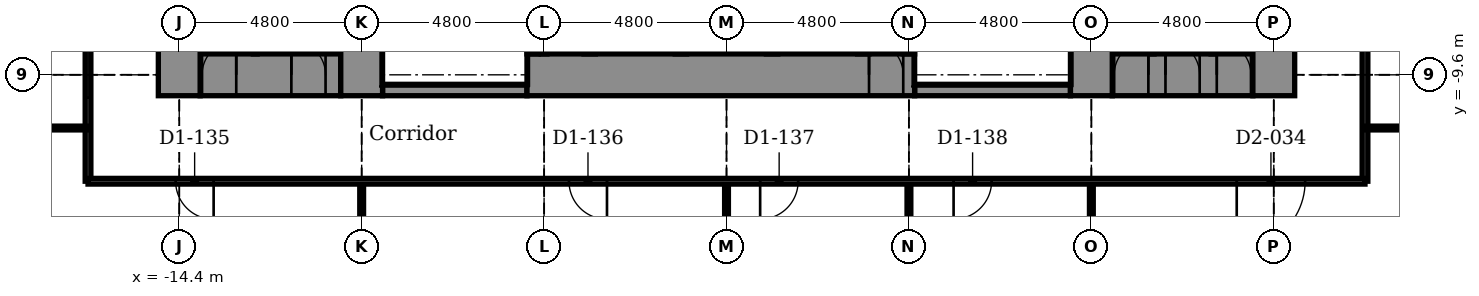
"""IFC4 building model, lengths in metres.
Left out: names, types, materials, properties, quantities, classifications, styles, units other than length and angle.
Written with IfcOpenShell. Run it as: python <this file> out.ifc"""

import sys

from ifc_helpers import new_model, si_unit, direction, frame, frame_2d, origin, place, context, subcontext, project, spatial, rectangle, extrude, element, fill, save


model = new_model("IFC4")
c1 = context("Model", 3, precision=1e-05, world=origin(), true_north=direction((0.0, 1.0)))
c2 = subcontext(c1, "Body", "Model", "MODEL_VIEW")
j1 = project(units=[si_unit("LENGTHUNIT", "METRE"), si_unit("PLANEANGLEUNIT", "RADIAN")], contexts=[c1])
p1 = place(None, origin())
s1 = spatial("IfcSite", under=j1, at=p1, CompositionType="ELEMENT")
p2 = place(p1, origin())
s2 = spatial("IfcBuilding", under=s1, at=p2, CompositionType="ELEMENT")
p3 = place(p2, frame((0.0, 0.0, 60.9)))
s3 = spatial("IfcBuildingStorey", under=s2, at=p3, CompositionType="ELEMENT", Elevation=60.9)
p4 = place(p3, frame((-9.05, -10.0, -0.25), z_axis=(0.0, 0.0, 1.0), x_axis=(1.0, 0.0, 0.0)))
e1 = element("IfcWall", 1, at=p4, inside=s3, PredefinedType="STANDARD", context=c2, shape_type="SweptSolid", body=[
    extrude(rectangle(XDim=3.8, YDim=0.3, at=frame_2d((1.9, 0.0))), origin(), (0.0, 0.0, 1.0), 5.45),
])
p5 = place(p3, frame((4.95, -10.0, -0.25), z_axis=(0.0, 0.0, 1.0), x_axis=(1.0, 0.0, 0.0)))
e2 = element("IfcWall", 2, at=p5, inside=s3, PredefinedType="STANDARD", context=c2, shape_type="SweptSolid", body=[
    extrude(rectangle(XDim=4.1, YDim=0.3, at=frame_2d((2.05, 0.0))), origin(), (0.0, 0.0, 1.0), 5.45),
])
p6 = place(p3, frame((-13.85, -9.6, -0.25), z_axis=(0.0, 0.0, 1.0), x_axis=(1.0, 0.0, 0.0)))
e3 = element("IfcWall", 3, at=p6, inside=s3, PredefinedType="SHEAR", context=c2, shape_type="SweptSolid", body=[
    extrude(rectangle(XDim=3.7, YDim=1.1, at=frame_2d((1.85, 0.0))), origin(), (0.0, 0.0, 1.0), 5.45),
])
p7 = place(p6, frame((0.05, 0.0, 0.25)))
e4 = element("IfcOpeningElement", 4, at=p7, cuts=e3, PredefinedType="OPENING", context=c2, shape_type="SweptSolid", body=[
    extrude(rectangle(XDim=0.9, YDim=2.1, at=frame_2d((0.45, 1.05))), frame((0.0, 0.56, 0.0), z_axis=(0.0, -1.0, 0.0), x_axis=(1.0, 0.0, 0.0)), (0.0, 0.0, 1.0), 1.12),
])
p8 = place(p6, frame((2.4, 0.0, 0.25)))
e5 = element("IfcOpeningElement", 5, at=p8, cuts=e3, PredefinedType="OPENING", context=c2, shape_type="SweptSolid", body=[
    extrude(rectangle(XDim=0.9, YDim=2.1, at=frame_2d((0.45, 1.05))), frame((0.0, 0.56, 0.0), z_axis=(0.0, -1.0, 0.0), x_axis=(1.0, 0.0, 0.0)), (0.0, 0.0, 1.0), 1.12),
])
p9 = place(p3, frame((-5.25, -9.6, -0.25), z_axis=(0.0, 0.0, 1.0), x_axis=(1.0, 0.0, 0.0)))
e6 = element("IfcWall", 6, at=p9, inside=s3, PredefinedType="SHEAR", context=c2, shape_type="SweptSolid", body=[
    extrude(rectangle(XDim=10.2, YDim=1.1, at=frame_2d((5.1, 0.0))), origin(), (0.0, 0.0, 1.0), 5.45),
])
p10 = place(p9, frame((9.0, 0.0, 0.25)))
e7 = element("IfcOpeningElement", 7, at=p10, cuts=e6, PredefinedType="OPENING", context=c2, shape_type="SweptSolid", body=[
    extrude(rectangle(XDim=0.9, YDim=2.1, at=frame_2d((0.45, 1.05))), frame((0.0, 0.56, 0.0), z_axis=(0.0, -1.0, 0.0), x_axis=(1.0, 0.0, 0.0)), (0.0, 0.0, 1.0), 1.12),
])
p11 = place(p3, frame((10.15, -9.6, -0.25), z_axis=(0.0, 0.0, 1.0), x_axis=(1.0, 0.0, 0.0)))
e8 = element("IfcWall", 8, at=p11, inside=s3, PredefinedType="SHEAR", context=c2, shape_type="SweptSolid", body=[
    extrude(rectangle(XDim=3.7, YDim=1.1, at=frame_2d((1.85, 0.0))), origin(), (0.0, 0.0, 1.0), 5.45),
])
p12 = place(p11, frame((0.05, 0.0, 0.25)))
e9 = element("IfcOpeningElement", 9, at=p12, cuts=e8, PredefinedType="OPENING", context=c2, shape_type="SweptSolid", body=[
    extrude(rectangle(XDim=0.9, YDim=2.1, at=frame_2d((0.45, 1.05))), frame((0.0, 0.56, 0.0), z_axis=(0.0, -1.0, 0.0), x_axis=(1.0, 0.0, 0.0)), (0.0, 0.0, 1.0), 1.12),
])
p13 = place(p11, frame((1.4, 0.0, 0.25)))
e10 = element("IfcOpeningElement", 10, at=p13, cuts=e8, PredefinedType="OPENING", context=c2, shape_type="SweptSolid", body=[
    extrude(rectangle(XDim=0.9, YDim=2.1, at=frame_2d((0.45, 1.05))), frame((0.0, 0.56, 0.0), z_axis=(0.0, -1.0, 0.0), x_axis=(1.0, 0.0, 0.0)), (0.0, 0.0, 1.0), 1.12),
])
p14 = place(p11, frame((2.75, 0.0, 0.25)))
e11 = element("IfcOpeningElement", 11, at=p14, cuts=e8, PredefinedType="OPENING", context=c2, shape_type="SweptSolid", body=[
    extrude(rectangle(XDim=0.9, YDim=2.1, at=frame_2d((0.45, 1.05))), frame((0.0, 0.56, 0.0), z_axis=(0.0, -1.0, 0.0), x_axis=(1.0, 0.0, 0.0)), (0.0, 0.0, 1.0), 1.12),
])
p15 = place(p3, frame((-14.4, -10.15, -0.25), z_axis=(0.0, 0.0, 1.0), x_axis=(0.0, 1.0, 0.0)))
e12 = element("IfcWall", 12, at=p15, inside=s3, PredefinedType="SHEAR", context=c2, shape_type="SweptSolid", body=[
    extrude(rectangle(XDim=20.3, YDim=1.1, at=frame_2d((10.15, 0.0))), origin(), (0.0, 0.0, 1.0), 5.45),
])
p16 = place(p15, frame((3.6, 0.0, 0.25)))
e13 = element("IfcOpeningElement", 13, at=p16, cuts=e12, PredefinedType="OPENING", context=c2, shape_type="SweptSolid", body=[
    extrude(rectangle(XDim=1.1, YDim=2.1, at=frame_2d((0.55, 1.05))), frame((0.0, 0.56, 0.0), z_axis=(0.0, -1.0, 0.0), x_axis=(1.0, 0.0, 0.0)), (0.0, 0.0, 1.0), 1.12),
])
p17 = place(p15, frame((6.0, 0.0, 0.25)))
e14 = element("IfcOpeningElement", 14, at=p17, cuts=e12, PredefinedType="OPENING", context=c2, shape_type="SweptSolid", body=[
    extrude(rectangle(XDim=1.1, YDim=2.1, at=frame_2d((0.55, 1.05))), frame((0.0, 0.56, 0.0), z_axis=(0.0, -1.0, 0.0), x_axis=(1.0, 0.0, 0.0)), (0.0, 0.0, 1.0), 1.12),
])
p18 = place(p15, frame((8.4, 0.0, 0.25)))
e15 = element("IfcOpeningElement", 15, at=p18, cuts=e12, PredefinedType="OPENING", context=c2, shape_type="SweptSolid", body=[
    extrude(rectangle(XDim=1.1, YDim=2.1, at=frame_2d((0.55, 1.05))), frame((0.0, 0.56, 0.0), z_axis=(0.0, -1.0, 0.0), x_axis=(1.0, 0.0, 0.0)), (0.0, 0.0, 1.0), 1.12),
])
p19 = place(p15, frame((10.8, 0.0, 0.25)))
e16 = element("IfcOpeningElement", 16, at=p19, cuts=e12, PredefinedType="OPENING", context=c2, shape_type="SweptSolid", body=[
    extrude(rectangle(XDim=1.1, YDim=2.1, at=frame_2d((0.55, 1.05))), frame((0.0, 0.56, 0.0), z_axis=(0.0, -1.0, 0.0), x_axis=(1.0, 0.0, 0.0)), (0.0, 0.0, 1.0), 1.12),
])
p20 = place(p3, frame((-9.6, -10.15, -0.25), z_axis=(0.0, 0.0, 1.0), x_axis=(0.0, 1.0, 0.0)))
e17 = element("IfcWall", 17, at=p20, inside=s3, PredefinedType="SHEAR", context=c2, shape_type="SweptSolid", body=[
    extrude(rectangle(XDim=7.6, YDim=1.1, at=frame_2d((3.8, 0.0))), origin(), (0.0, 0.0, 1.0), 5.45),
])
p21 = place(p3, frame((-5.1, -9.05, -0.25), z_axis=(0.0, 0.0, 1.0), x_axis=(0.0, 1.0, 0.0)))
e18 = element("IfcWall", 18, at=p21, inside=s3, PredefinedType="STANDARD", context=c2, shape_type="SweptSolid", body=[
    extrude(rectangle(XDim=6.8, YDim=0.3, at=frame_2d((3.4, 0.0))), origin(), (0.0, 0.0, 1.0), 5.45),
])
p22 = place(p21, frame((3.6, 0.0, 0.25)))
e19 = element("IfcOpeningElement", 19, at=p22, cuts=e18, PredefinedType="OPENING", context=c2, shape_type="SweptSolid", body=[
    extrude(rectangle(XDim=1.2, YDim=2.1, at=frame_2d((0.6, 1.05))), frame((0.0, 0.16, 0.0), z_axis=(0.0, -1.0, 0.0), x_axis=(1.0, 0.0, 0.0)), (0.0, 0.0, 1.0), 0.32),
])
for number, where, z_axis, x_axis in (
    (20, (-3.6, -9.05, -0.25), (0.0, 0.0, 1.0), (0.0, 1.0, 0.0)),
    (21, (-1.2, -9.05, -0.25), (0.0, 0.0, 1.0), (0.0, 1.0, 0.0)),
    (22, (1.2, -9.05, -0.25), (0.0, 0.0, 1.0), (0.0, 1.0, 0.0)),
    (23, (3.6, -9.05, -0.25), (0.0, 0.0, 1.0), (0.0, 1.0, 0.0)),
):
    element("IfcWall", number, at=place(p3, frame(where, z_axis=z_axis, x_axis=x_axis)), inside=s3, PredefinedType="STANDARD", context=c2, shape_type="SweptSolid", body=[
        extrude(rectangle(XDim=3.2, YDim=0.3, at=frame_2d((1.6, 0.0))), origin(), (0.0, 0.0, 1.0), 5.45),
    ])
p23 = place(p3, frame((4.8, -9.05, -0.25), z_axis=(0.0, 0.0, 1.0), x_axis=(0.0, 1.0, 0.0)))
e24 = element("IfcWall", 24, at=p23, inside=s3, PredefinedType="STANDARD", context=c2, shape_type="SweptSolid", body=[
    extrude(rectangle(XDim=6.8, YDim=0.3, at=frame_2d((3.4, 0.0))), origin(), (0.0, 0.0, 1.0), 5.45),
])
p24 = place(p23, frame((3.6, 0.0, 0.25)))
e25 = element("IfcOpeningElement", 25, at=p24, cuts=e24, PredefinedType="OPENING", context=c2, shape_type="SweptSolid", body=[
    extrude(rectangle(XDim=1.2, YDim=2.1, at=frame_2d((0.6, 1.05))), frame((0.0, 0.16, 0.0), z_axis=(0.0, -1.0, 0.0), x_axis=(1.0, 0.0, 0.0)), (0.0, 0.0, 1.0), 0.32),
])
p25 = place(p3, frame((9.6, -10.15, -0.25), z_axis=(0.0, 0.0, 1.0), x_axis=(0.0, 1.0, 0.0)))
e26 = element("IfcWall", 26, at=p25, inside=s3, PredefinedType="SHEAR", context=c2, shape_type="SweptSolid", body=[
    extrude(rectangle(XDim=20.3, YDim=1.1, at=frame_2d((10.15, 0.0))), origin(), (0.0, 0.0, 1.0), 5.45),
])
p26 = place(p3, frame((14.4, -10.15, -0.25), z_axis=(0.0, 0.0, 1.0), x_axis=(0.0, 1.0, 0.0)))
e27 = element("IfcWall", 27, at=p26, inside=s3, PredefinedType="SHEAR", context=c2, shape_type="SweptSolid", body=[
    extrude(rectangle(XDim=20.3, YDim=1.1, at=frame_2d((10.15, 0.0))), origin(), (0.0, 0.0, 1.0), 5.45),
])
p27 = place(p26, frame((3.6, 0.0, 0.25)))
e28 = element("IfcOpeningElement", 28, at=p27, cuts=e27, PredefinedType="OPENING", context=c2, shape_type="SweptSolid", body=[
    extrude(rectangle(XDim=1.1, YDim=2.1, at=frame_2d((0.55, 1.05))), frame((0.0, 0.56, 0.0), z_axis=(0.0, -1.0, 0.0), x_axis=(1.0, 0.0, 0.0)), (0.0, 0.0, 1.0), 1.12),
])
p28 = place(p26, frame((6.0, 0.0, 0.25)))
e29 = element("IfcOpeningElement", 29, at=p28, cuts=e27, PredefinedType="OPENING", context=c2, shape_type="SweptSolid", body=[
    extrude(rectangle(XDim=1.1, YDim=2.1, at=frame_2d((0.55, 1.05))), frame((0.0, 0.56, 0.0), z_axis=(0.0, -1.0, 0.0), x_axis=(1.0, 0.0, 0.0)), (0.0, 0.0, 1.0), 1.12),
])
p29 = place(p26, frame((8.4, 0.0, 0.25)))
e30 = element("IfcOpeningElement", 30, at=p29, cuts=e27, PredefinedType="OPENING", context=c2, shape_type="SweptSolid", body=[
    extrude(rectangle(XDim=1.1, YDim=2.1, at=frame_2d((0.55, 1.05))), frame((0.0, 0.56, 0.0), z_axis=(0.0, -1.0, 0.0), x_axis=(1.0, 0.0, 0.0)), (0.0, 0.0, 1.0), 1.12),
])
p30 = place(p26, frame((10.8, 0.0, 0.25)))
e31 = element("IfcOpeningElement", 31, at=p30, cuts=e27, PredefinedType="OPENING", context=c2, shape_type="SweptSolid", body=[
    extrude(rectangle(XDim=1.1, YDim=2.1, at=frame_2d((0.55, 1.05))), frame((0.0, 0.56, 0.0), z_axis=(0.0, -1.0, 0.0), x_axis=(1.0, 0.0, 0.0)), (0.0, 0.0, 1.0), 1.12),
])
p31 = place(p3, frame((16.8, -12.4, 0.0), z_axis=(0.0, 0.0, 1.0), x_axis=(0.0, 1.0, 0.0)))
e32 = element("IfcWall", 32, at=p31, inside=s3, PredefinedType="PARTITIONING", context=c2, shape_type="SweptSolid", body=[
    extrude(rectangle(XDim=8.45, YDim=0.15, at=frame_2d((4.225, 0.0))), origin(), (0.0, 0.0, 1.0), 5.2),
])
p32 = place(p31, frame((5.575, 0.0, 0.0)))
e33 = element("IfcOpeningElement", 33, at=p32, cuts=e32, PredefinedType="OPENING", context=c2, shape_type="SweptSolid", body=[
    extrude(rectangle(XDim=1.8, YDim=2.1, at=frame_2d((0.9, 1.05))), frame((0.0, 0.085, 0.0), z_axis=(0.0, -1.0, 0.0), x_axis=(1.0, 0.0, 0.0)), (0.0, 0.0, 1.0), 0.17),
])
for number, where, z_axis, x_axis in (
    (34, (12.8, -9.05, 0.0), (0.0, 0.0, 1.0), (0.0, 1.0, 0.0)),
    (35, (11.2, -9.05, 0.0), (0.0, 0.0, 1.0), (0.0, 1.0, 0.0)),
):
    element("IfcWall", number, at=place(p3, frame(where, z_axis=z_axis, x_axis=x_axis)), inside=s3, PredefinedType="PARTITIONING", context=c2, shape_type="SweptSolid", body=[
        extrude(rectangle(XDim=1.7, YDim=0.1, at=frame_2d((0.85, 0.0))), origin(), (0.0, 0.0, 1.0), 5.2),
    ])
p33 = place(p3, frame((9.6, -18.6, 0.0), z_axis=(0.0, 0.0, 1.0), x_axis=(0.0, 1.0, 0.0)))
e36 = element("IfcWall", 36, at=p33, inside=s3, PredefinedType="PARTITIONING", context=c2, shape_type="SweptSolid", body=[
    extrude(rectangle(XDim=6.2, YDim=0.1, at=frame_2d((3.1, 0.0))), origin(), (0.0, 0.0, 1.0), 4.667),
])
p34 = place(p3, frame((4.8, -19.106, 0.0), z_axis=(0.0, 0.0, 1.0), x_axis=(0.0, 1.0, 0.0)))
e37 = element("IfcWall", 37, at=p34, inside=s3, PredefinedType="PARTITIONING", context=c2, shape_type="SweptSolid", body=[
    extrude(rectangle(XDim=6.707, YDim=0.1, at=frame_2d((3.353, 0.0))), origin(), (0.0, 0.0, 1.0), 4.667),
])
p35 = place(p3, frame((0.0, -18.6, 0.0), z_axis=(0.0, 0.0, 1.0), x_axis=(0.0, 1.0, 0.0)))
e38 = element("IfcWall", 38, at=p35, inside=s3, PredefinedType="PARTITIONING", context=c2, shape_type="SweptSolid", body=[
    extrude(rectangle(XDim=6.2, YDim=0.1, at=frame_2d((3.1, 0.0))), origin(), (0.0, 0.0, 1.0), 4.667),
])
p36 = place(p3, frame((-4.8, -9.05, 0.0), z_axis=(0.0, 0.0, 1.0), x_axis=(0.0, 1.0, 0.0)))
e39 = element("IfcWall", 39, at=p36, inside=s3, PredefinedType="PARTITIONING", context=c2, shape_type="SweptSolid", body=[
    extrude(rectangle(XDim=3.05, YDim=0.15, at=frame_2d((1.525, 0.0))), origin(), (0.0, 0.0, 1.0), 5.2),
])
p37 = place(p3, frame((-9.6, -18.6, 0.0), z_axis=(0.0, 0.0, 1.0), x_axis=(0.0, 1.0, 0.0)))
e40 = element("IfcWall", 40, at=p37, inside=s3, PredefinedType="PARTITIONING", context=c2, shape_type="SweptSolid", body=[
    extrude(rectangle(XDim=6.2, YDim=0.1, at=frame_2d((3.1, 0.0))), origin(), (0.0, 0.0, 1.0), 4.667),
])
p38 = place(p3, frame((-12.4, -9.05, 0.0), z_axis=(0.0, 0.0, 1.0), x_axis=(0.0, 1.0, 0.0)))
e41 = element("IfcWall", 41, at=p38, inside=s3, PredefinedType="PARTITIONING", context=c2, shape_type="SweptSolid", body=[
    extrude(rectangle(XDim=1.7, YDim=0.1, at=frame_2d((0.85, 0.0))), origin(), (0.0, 0.0, 1.0), 5.2),
])
p39 = place(p3, frame((-16.8, -12.4, 0.0), z_axis=(0.0, 0.0, 1.0), x_axis=(0.0, 1.0, 0.0)))
e42 = element("IfcWall", 42, at=p39, inside=s3, PredefinedType="PARTITIONING", context=c2, shape_type="SweptSolid", body=[
    extrude(rectangle(XDim=8.45, YDim=0.15, at=frame_2d((4.225, 0.0))), origin(), (0.0, 0.0, 1.0), 5.2),
])
p40 = place(p39, frame((5.575, 0.0, 0.0)))
e43 = element("IfcOpeningElement", 43, at=p40, cuts=e42, PredefinedType="OPENING", context=c2, shape_type="SweptSolid", body=[
    extrude(rectangle(XDim=1.8, YDim=2.1, at=frame_2d((0.9, 1.05))), frame((0.0, 0.085, 0.0), z_axis=(0.0, -1.0, 0.0), x_axis=(1.0, 0.0, 0.0)), (0.0, 0.0, 1.0), 0.17),
])
p41 = place(p39, frame((2.2, 0.0, 0.9)))
e44 = element("IfcOpeningElement", 44, at=p41, cuts=e42, PredefinedType="OPENING", context=c2, shape_type="SweptSolid", body=[
    extrude(rectangle(XDim=1.8, YDim=1.5, at=frame_2d((0.9, 0.75))), frame((0.0, 0.085, 0.0), z_axis=(0.0, -1.0, 0.0), x_axis=(1.0, 0.0, 0.0)), (0.0, 0.0, 1.0), 0.17),
])
p42 = place(p3, frame((-16.8, -12.4, 0.0), z_axis=(0.0, 0.0, 1.0), x_axis=(1.0, 0.0, 0.0)))
e45 = element("IfcWall", 45, at=p42, inside=s3, PredefinedType="PARTITIONING", context=c2, shape_type="SweptSolid", body=[
    extrude(rectangle(XDim=33.6, YDim=0.15, at=frame_2d((16.8, 0.0))), origin(), (0.0, 0.0, 1.0), 5.2),
])
p43 = place(p42, frame((2.305, 0.0, 0.0)))
e46 = element("IfcOpeningElement", 46, at=p43, cuts=e45, PredefinedType="OPENING", context=c2, shape_type="SweptSolid", body=[
    extrude(rectangle(XDim=1.0, YDim=2.1, at=frame_2d((0.5, 1.05))), frame((0.0, 0.085, 0.0), z_axis=(0.0, -1.0, 0.0), x_axis=(1.0, 0.0, 0.0)), (0.0, 0.0, 1.0), 0.17),
])
p44 = place(p42, frame((12.655, 0.0, 0.0)))
e47 = element("IfcOpeningElement", 47, at=p44, cuts=e45, PredefinedType="OPENING", context=c2, shape_type="SweptSolid", body=[
    extrude(rectangle(XDim=1.0, YDim=2.1, at=frame_2d((0.5, 1.05))), frame((0.0, 0.085, 0.0), z_axis=(0.0, -1.0, 0.0), x_axis=(1.0, 0.0, 0.0)), (0.0, 0.0, 1.0), 0.17),
])
p45 = place(p42, frame((17.685, 0.0, 0.0)))
e48 = element("IfcOpeningElement", 48, at=p45, cuts=e45, PredefinedType="OPENING", context=c2, shape_type="SweptSolid", body=[
    extrude(rectangle(XDim=1.0, YDim=2.1, at=frame_2d((0.5, 1.05))), frame((0.0, 0.085, 0.0), z_axis=(0.0, -1.0, 0.0), x_axis=(1.0, 0.0, 0.0)), (0.0, 0.0, 1.0), 0.17),
])
p46 = place(p42, frame((22.775, 0.0, 0.0)))
e49 = element("IfcOpeningElement", 49, at=p46, cuts=e45, PredefinedType="OPENING", context=c2, shape_type="SweptSolid", body=[
    extrude(rectangle(XDim=1.0, YDim=2.1, at=frame_2d((0.5, 1.05))), frame((0.0, 0.085, 0.0), z_axis=(0.0, -1.0, 0.0), x_axis=(1.0, 0.0, 0.0)), (0.0, 0.0, 1.0), 0.17),
])
p47 = place(p42, frame((30.225, 0.0, 0.0)))
e50 = element("IfcOpeningElement", 50, at=p47, cuts=e45, PredefinedType="OPENING", context=c2, shape_type="SweptSolid", body=[
    extrude(rectangle(XDim=1.8, YDim=2.1, at=frame_2d((0.9, 1.05))), frame((0.0, 0.085, 0.0), z_axis=(0.0, -1.0, 0.0), x_axis=(1.0, 0.0, 0.0)), (0.0, 0.0, 1.0), 0.17),
])
for number, where, z_axis, x_axis in (
    (51, (-30.178, -11.0, 0.0), (0.0, 0.0, 1.0), (1.0, 0.0, 0.0)),
    (52, (16.8, -11.0, 0.0), (0.0, 0.0, 1.0), (1.0, 0.0, 0.0)),
):
    element("IfcWall", number, at=place(p3, frame(where, z_axis=z_axis, x_axis=x_axis)), inside=s3, PredefinedType="PARTITIONING", context=c2, shape_type="SweptSolid", body=[
        extrude(rectangle(XDim=13.378, YDim=0.1, at=frame_2d((6.689, 0.0))), origin(), (0.0, 0.0, 1.0), 5.2),
    ])
p48 = place(p43, frame((1.0, 0.0, 0.0), z_axis=(0.0, 0.0, 1.0), x_axis=(-1.0, 0.0, 0.0)))
e53 = element("IfcDoor", 53, at=p48, inside=s3, OperationType="SINGLE_SWING_RIGHT", PredefinedType="DOOR", context=c2, shape_type="SweptSolid", body=[
    extrude(rectangle(XDim=1.0, YDim=2.1, at=frame_2d((0.5, 1.05))), frame((0.0, 0.025, 0.0), z_axis=(0.0, -1.0, 0.0), x_axis=(1.0, 0.0, 0.0)), (0.0, 0.0, 1.0), 0.05),
])
fill(e46, e53)
p49 = place(p44, frame((1.0, 0.0, 0.0), z_axis=(0.0, 0.0, 1.0), x_axis=(-1.0, 0.0, 0.0)))
e54 = element("IfcDoor", 54, at=p49, inside=s3, OperationType="SINGLE_SWING_RIGHT", PredefinedType="DOOR", context=c2, shape_type="SweptSolid", body=[
    extrude(rectangle(XDim=1.0, YDim=2.1, at=frame_2d((0.5, 1.05))), frame((0.0, 0.025, 0.0), z_axis=(0.0, -1.0, 0.0), x_axis=(1.0, 0.0, 0.0)), (0.0, 0.0, 1.0), 0.05),
])
fill(e47, e54)
p50 = place(p45, frame((1.0, 0.0, 0.0), z_axis=(0.0, 0.0, 1.0), x_axis=(-1.0, 0.0, 0.0)))
e55 = element("IfcDoor", 55, at=p50, inside=s3, OperationType="SINGLE_SWING_LEFT", PredefinedType="DOOR", context=c2, shape_type="SweptSolid", body=[
    extrude(rectangle(XDim=1.0, YDim=2.1, at=frame_2d((0.5, 1.05))), frame((0.0, 0.025, 0.0), z_axis=(0.0, -1.0, 0.0), x_axis=(1.0, 0.0, 0.0)), (0.0, 0.0, 1.0), 0.05),
])
fill(e48, e55)
p51 = place(p46, frame((1.0, 0.0, 0.0), z_axis=(0.0, 0.0, 1.0), x_axis=(-1.0, 0.0, 0.0)))
e56 = element("IfcDoor", 56, at=p51, inside=s3, OperationType="SINGLE_SWING_LEFT", PredefinedType="DOOR", context=c2, shape_type="SweptSolid", body=[
    extrude(rectangle(XDim=1.0, YDim=2.1, at=frame_2d((0.5, 1.05))), frame((0.0, 0.025, 0.0), z_axis=(0.0, -1.0, 0.0), x_axis=(1.0, 0.0, 0.0)), (0.0, 0.0, 1.0), 0.05),
])
fill(e49, e56)
p52 = place(p47, frame((1.8, 0.0, 0.0), z_axis=(0.0, 0.0, 1.0), x_axis=(-1.0, 0.0, 0.0)))
e57 = element("IfcDoor", 57, at=p52, inside=s3, OperationType="SINGLE_SWING_LEFT", PredefinedType="DOOR", context=c2, shape_type="SweptSolid", body=[
    extrude(rectangle(XDim=1.8, YDim=2.1, at=frame_2d((0.9, 1.05))), frame((0.0, 0.025, 0.0), z_axis=(0.0, -1.0, 0.0), x_axis=(1.0, 0.0, 0.0)), (0.0, 0.0, 1.0), 0.05),
])
fill(e50, e57)
p53 = place(p12, origin())
e58 = element("IfcDoor", 58, at=p53, inside=s3, OperationType="SINGLE_SWING_RIGHT", PredefinedType="DOOR", context=c2, shape_type="SweptSolid", body=[
    extrude(rectangle(XDim=0.9, YDim=2.1, at=frame_2d((0.45, 1.05))), frame((0.0, 0.025, 0.0), z_axis=(0.0, -1.0, 0.0), x_axis=(1.0, 0.0, 0.0)), (0.0, 0.0, 1.0), 0.05),
])
fill(e9, e58)
p54 = place(p13, origin())
e59 = element("IfcDoor", 59, at=p54, inside=s3, OperationType="SINGLE_SWING_LEFT", PredefinedType="DOOR", context=c2, shape_type="SweptSolid", body=[
    extrude(rectangle(XDim=0.9, YDim=2.1, at=frame_2d((0.45, 1.05))), frame((0.0, 0.025, 0.0), z_axis=(0.0, -1.0, 0.0), x_axis=(1.0, 0.0, 0.0)), (0.0, 0.0, 1.0), 0.05),
])
fill(e10, e59)
p55 = place(p14, origin())
e60 = element("IfcDoor", 60, at=p55, inside=s3, OperationType="SINGLE_SWING_LEFT", PredefinedType="DOOR", context=c2, shape_type="SweptSolid", body=[
    extrude(rectangle(XDim=0.9, YDim=2.1, at=frame_2d((0.45, 1.05))), frame((0.0, 0.025, 0.0), z_axis=(0.0, -1.0, 0.0), x_axis=(1.0, 0.0, 0.0)), (0.0, 0.0, 1.0), 0.05),
])
fill(e11, e60)
p56 = place(p7, origin())
e61 = element("IfcDoor", 61, at=p56, inside=s3, OperationType="SINGLE_SWING_RIGHT", PredefinedType="DOOR", context=c2, shape_type="SweptSolid", body=[
    extrude(rectangle(XDim=0.9, YDim=2.1, at=frame_2d((0.45, 1.05))), frame((0.0, 0.025, 0.0), z_axis=(0.0, -1.0, 0.0), x_axis=(1.0, 0.0, 0.0)), (0.0, 0.0, 1.0), 0.05),
])
fill(e4, e61)
p57 = place(p8, origin())
e62 = element("IfcDoor", 62, at=p57, inside=s3, OperationType="SINGLE_SWING_LEFT", PredefinedType="DOOR", context=c2, shape_type="SweptSolid", body=[
    extrude(rectangle(XDim=0.9, YDim=2.1, at=frame_2d((0.45, 1.05))), frame((0.0, 0.025, 0.0), z_axis=(0.0, -1.0, 0.0), x_axis=(1.0, 0.0, 0.0)), (0.0, 0.0, 1.0), 0.05),
])
fill(e5, e62)
p58 = place(p10, origin())
e63 = element("IfcDoor", 63, at=p58, inside=s3, OperationType="SINGLE_SWING_LEFT", PredefinedType="DOOR", context=c2, shape_type="SweptSolid", body=[
    extrude(rectangle(XDim=0.9, YDim=2.1, at=frame_2d((0.45, 1.05))), frame((0.0, 0.025, 0.0), z_axis=(0.0, -1.0, 0.0), x_axis=(1.0, 0.0, 0.0)), (0.0, 0.0, 1.0), 0.05),
])
fill(e7, e63)
p59 = place(p41, origin())
e64 = element("IfcWindow", 64, at=p59, inside=s3, PartitioningType="SINGLE_PANEL", PredefinedType="WINDOW", context=c2, shape_type="SweptSolid", body=[
    extrude(rectangle(XDim=1.8, YDim=1.5, at=frame_2d((0.9, 0.75))), frame((0.0, 0.03, 0.0), z_axis=(0.0, -1.0, 0.0), x_axis=(1.0, 0.0, 0.0)), (0.0, 0.0, 1.0), 0.06),
])
fill(e44, e64)
save(model, sys.argv[1])
